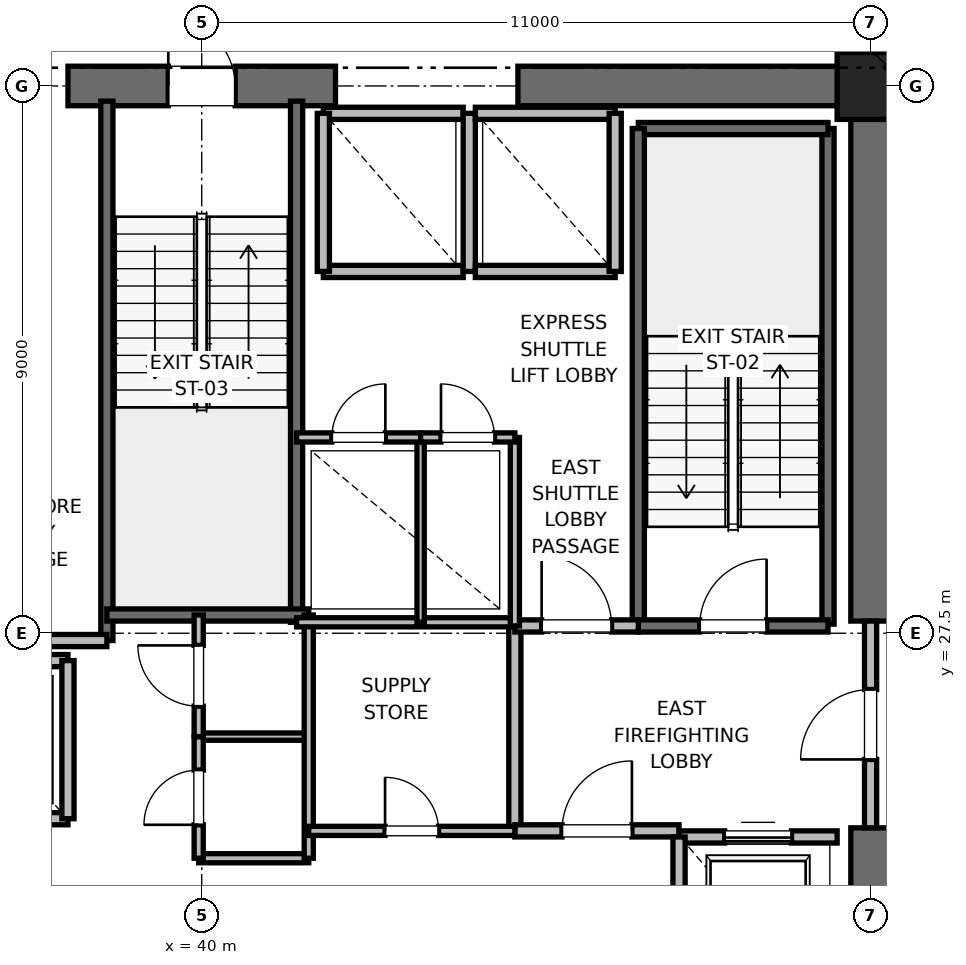
"""IFC4 building model, lengths in metres.
Left out: names, types, materials, properties, quantities, classifications, styles, units other than length and angle.
Written with IfcOpenShell. Run it as: python <this file> out.ifc"""

import sys

from ifc_helpers import new_model, si_unit, direction, frame, frame_2d, origin, origin_2d, place, context, subcontext, project, spatial, rectangle, extrude, element, fill, save


model = new_model("IFC4")
c1 = context("Model", 3, precision=1e-05, world=origin(), true_north=direction((0.0, 1.0)))
c2 = subcontext(c1, "Body", "Model", "MODEL_VIEW")
j1 = project(units=[si_unit("LENGTHUNIT", "METRE"), si_unit("PLANEANGLEUNIT", "RADIAN")], contexts=[c1])
p1 = place(None, origin())
s1 = spatial("IfcSite", under=j1, at=p1, CompositionType="ELEMENT")
p2 = place(p1, origin())
s2 = spatial("IfcBuilding", under=s1, at=p2, CompositionType="ELEMENT")
p3 = place(p2, frame((0.0, 0.0, 87.6)))
s3 = spatial("IfcBuildingStorey", under=s2, at=p3, CompositionType="ELEMENT", Elevation=87.6)
p4 = place(p3, frame((51.0, 36.5, 0.0), z_axis=(0.0, 0.0, 1.0), x_axis=(1.0, 0.0, 0.0)))
e1 = element("IfcColumn", 1, at=p4, inside=s3, PredefinedType="PILASTER", context=c2, shape_type="SweptSolid", body=[
    extrude(rectangle(XDim=1.1, YDim=1.1, at=origin_2d()), origin(), (0.0, 0.0, 1.0), 4.0),
])
p5 = place(p3, frame((37.8, 36.5, 0.0), z_axis=(0.0, 0.0, 1.0), x_axis=(1.0, 0.0, 0.0)))
e2 = element("IfcWall", 2, at=p5, inside=s3, PredefinedType="SHEAR", context=c2, shape_type="SweptSolid", body=[
    extrude(rectangle(XDim=4.4, YDim=0.65, at=frame_2d((2.2, 0.0))), origin(), (0.0, 0.0, 1.0), 3.76),
])
p6 = place(p5, frame((1.65, 0.0, 0.0)))
e3 = element("IfcOpeningElement", 3, at=p6, cuts=e2, PredefinedType="OPENING", context=c2, shape_type="SweptSolid", body=[
    extrude(rectangle(XDim=1.1, YDim=2.15, at=frame_2d((0.55, 1.075))), frame((0.0, 0.325, 0.0), z_axis=(0.0, -1.0, 0.0), x_axis=(1.0, 0.0, 0.0)), (0.0, 0.0, 1.0), 0.65),
])
for number, where, z_axis, x_axis in (
    (4, (45.2, 36.5, 0.0), (0.0, 0.0, 1.0), (1.0, 0.0, 0.0)),
    (5, (51.0, 18.5, 0.0), (0.0, 0.0, 1.0), (0.0, 1.0, 0.0)),
):
    element("IfcWall", number, at=place(p3, frame(where, z_axis=z_axis, x_axis=x_axis)), inside=s3, PredefinedType="SHEAR", context=c2, shape_type="SweptSolid", body=[
        extrude(rectangle(XDim=5.8, YDim=0.65, at=frame_2d((2.9, 0.0))), origin(), (0.0, 0.0, 1.0), 3.76),
    ])
p7 = place(p3, frame((51.0, 27.7, 0.0), z_axis=(0.0, 0.0, 1.0), x_axis=(0.0, 1.0, 0.0)))
e6 = element("IfcWall", 6, at=p7, inside=s3, PredefinedType="SHEAR", context=c2, shape_type="SweptSolid", body=[
    extrude(rectangle(XDim=8.8, YDim=0.65, at=frame_2d((4.4, 0.0))), origin(), (0.0, 0.0, 1.0), 3.76),
])
p8 = place(p3, frame((50.3, 27.65, 0.0), z_axis=(0.0, 0.0, 1.0), x_axis=(0.0, 1.0, 0.0)))
e7 = element("IfcWall", 7, at=p8, inside=s3, PredefinedType="SOLIDWALL", context=c2, shape_type="SweptSolid", body=[
    extrude(rectangle(XDim=8.15, YDim=0.2, at=frame_2d((4.075, 0.0))), origin(), (0.0, 0.0, 1.0), 3.76),
])
p9 = place(p3, frame((47.18, 35.8, 0.0), z_axis=(0.0, 0.0, 1.0), x_axis=(1.0, 0.0, 0.0)))
e8 = element("IfcWall", 8, at=p9, inside=s3, PredefinedType="SOLIDWALL", context=c2, shape_type="SweptSolid", body=[
    extrude(rectangle(XDim=3.12, YDim=0.2, at=frame_2d((1.56, 0.0))), origin(), (0.0, 0.0, 1.0), 3.76),
])
p10 = place(p3, frame((47.18, 27.62, 0.0), z_axis=(0.0, 0.0, 1.0), x_axis=(0.0, 1.0, 0.0)))
e9 = element("IfcWall", 9, at=p10, inside=s3, PredefinedType="SOLIDWALL", context=c2, shape_type="SweptSolid", body=[
    extrude(rectangle(XDim=8.18, YDim=0.2, at=frame_2d((4.09, 0.0))), origin(), (0.0, 0.0, 1.0), 3.76),
])
p11 = place(p3, frame((47.18, 27.62, 0.0), z_axis=(0.0, 0.0, 1.0), x_axis=(1.0, 0.0, 0.0)))
e10 = element("IfcWall", 10, at=p11, inside=s3, PredefinedType="SOLIDWALL", context=c2, shape_type="SweptSolid", body=[
    extrude(rectangle(XDim=3.12, YDim=0.2, at=frame_2d((1.56, 0.0))), origin(), (0.0, 0.0, 1.0), 3.76),
])
p12 = place(p11, frame((1.01, 0.0, 0.0)))
e11 = element("IfcOpeningElement", 11, at=p12, cuts=e10, PredefinedType="OPENING", context=c2, shape_type="SweptSolid", body=[
    extrude(rectangle(XDim=1.1, YDim=2.15, at=frame_2d((0.55, 1.075))), frame((0.0, 0.1, 0.0), z_axis=(0.0, -1.0, 0.0), x_axis=(1.0, 0.0, 0.0)), (0.0, 0.0, 1.0), 0.2),
])
p13 = place(p3, frame((38.44, 27.38, 0.0), z_axis=(0.0, 0.0, 1.0), x_axis=(0.0, 1.0, 0.0)))
e12 = element("IfcWall", 12, at=p13, inside=s3, PredefinedType="SOLIDWALL", context=c2, shape_type="SweptSolid", body=[
    extrude(rectangle(XDim=8.87, YDim=0.2, at=frame_2d((4.435, 0.0))), origin(), (0.0, 0.0, 1.0), 3.76),
])
p14 = place(p3, frame((41.56, 27.68, 0.0), z_axis=(0.0, 0.0, 1.0), x_axis=(0.0, 1.0, 0.0)))
e13 = element("IfcWall", 13, at=p14, inside=s3, PredefinedType="SOLIDWALL", context=c2, shape_type="SweptSolid", body=[
    extrude(rectangle(XDim=8.57, YDim=0.2, at=frame_2d((4.285, 0.0))), origin(), (0.0, 0.0, 1.0), 3.76),
])
p15 = place(p3, frame((38.44, 27.8, 0.0), z_axis=(0.0, 0.0, 1.0), x_axis=(1.0, 0.0, 0.0)))
e14 = element("IfcWall", 14, at=p15, inside=s3, PredefinedType="SOLIDWALL", context=c2, shape_type="SweptSolid", body=[
    extrude(rectangle(XDim=3.32, YDim=0.2, at=frame_2d((1.66, 0.0))), origin(), (0.0, 0.0, 1.0), 3.76),
])
p16 = place(p3, frame((32.82, 27.38, 0.0), z_axis=(0.0, 0.0, 1.0), x_axis=(1.0, 0.0, 0.0)))
e15 = element("IfcWall", 15, at=p16, inside=s3, PredefinedType="PARTITIONING", context=c2, shape_type="SweptSolid", body=[
    extrude(rectangle(XDim=5.62, YDim=0.2, at=frame_2d((2.81, 0.0))), origin(), (0.0, 0.0, 1.0), 3.76),
])
p17 = place(p3, frame((45.15, 24.25, 0.0), z_axis=(0.0, 0.0, 1.0), x_axis=(0.0, 1.0, 0.0)))
e16 = element("IfcWall", 16, at=p17, inside=s3, PredefinedType="PARTITIONING", context=c2, shape_type="SweptSolid", body=[
    extrude(rectangle(XDim=3.37, YDim=0.2, at=frame_2d((1.685, 0.0))), origin(), (0.0, 0.0, 1.0), 3.76),
])
p18 = place(p3, frame((45.15, 24.25, 0.0), z_axis=(0.0, 0.0, 1.0), x_axis=(1.0, 0.0, 0.0)))
e17 = element("IfcWall", 17, at=p18, inside=s3, PredefinedType="PARTITIONING", context=c2, shape_type="SweptSolid", body=[
    extrude(rectangle(XDim=2.7, YDim=0.2, at=frame_2d((1.35, 0.0))), origin(), (0.0, 0.0, 1.0), 3.76),
])
p19 = place(p18, frame((0.775, 0.0, 0.0)))
e18 = element("IfcOpeningElement", 18, at=p19, cuts=e17, PredefinedType="OPENING", context=c2, shape_type="SweptSolid", body=[
    extrude(rectangle(XDim=1.15, YDim=2.2, at=frame_2d((0.575, 1.1))), frame((0.0, 0.1, 0.0), z_axis=(0.0, -1.0, 0.0), x_axis=(1.0, 0.0, 0.0)), (0.0, 0.0, 1.0), 0.2),
])
p20 = place(p3, frame((45.15, 27.62, 0.0), z_axis=(0.0, 0.0, 1.0), x_axis=(1.0, 0.0, 0.0)))
e19 = element("IfcWall", 19, at=p20, inside=s3, PredefinedType="PARTITIONING", context=c2, shape_type="SweptSolid", body=[
    extrude(rectangle(XDim=2.03, YDim=0.2, at=frame_2d((1.015, 0.0))), origin(), (0.0, 0.0, 1.0), 3.76),
])
p21 = place(p20, frame((0.44, 0.0, 0.0)))
e20 = element("IfcOpeningElement", 20, at=p21, cuts=e19, PredefinedType="OPENING", context=c2, shape_type="SweptSolid", body=[
    extrude(rectangle(XDim=1.15, YDim=2.2, at=frame_2d((0.575, 1.1))), frame((0.0, 0.1, 0.0), z_axis=(0.0, -1.0, 0.0), x_axis=(1.0, 0.0, 0.0)), (0.0, 0.0, 1.0), 0.2),
])
p22 = place(p3, frame((51.0, 24.3, 0.0), z_axis=(0.0, 0.0, 1.0), x_axis=(0.0, 1.0, 0.0)))
e21 = element("IfcWall", 21, at=p22, inside=s3, PredefinedType="PARTITIONING", context=c2, shape_type="SweptSolid", body=[
    extrude(rectangle(XDim=3.4, YDim=0.2, at=frame_2d((1.7, 0.0))), origin(), (0.0, 0.0, 1.0), 2.54),
])
p23 = place(p22, frame((1.125, 0.0, 0.0)))
e22 = element("IfcOpeningElement", 22, at=p23, cuts=e21, PredefinedType="OPENING", context=c2, shape_type="SweptSolid", body=[
    extrude(rectangle(XDim=1.15, YDim=2.2, at=frame_2d((0.575, 1.1))), frame((0.0, 0.1, 0.0), z_axis=(0.0, -1.0, 0.0), x_axis=(1.0, 0.0, 0.0)), (0.0, 0.0, 1.0), 0.2),
])
p24 = place(p3, frame((50.45, 24.15, 0.0), z_axis=(0.0, 0.0, 1.0), x_axis=(-1.0, 0.0, 0.0)))
e23 = element("IfcWall", 23, at=p24, inside=s3, PredefinedType="SOLIDWALL", context=c2, shape_type="SweptSolid", body=[
    extrude(rectangle(XDim=2.6, YDim=0.2, at=frame_2d((1.3, 0.0))), origin(), (0.0, 0.0, 1.0), 2.54),
])
p25 = place(p24, frame((0.75, 0.0, 0.0)))
e24 = element("IfcOpeningElement", 24, at=p25, cuts=e23, PredefinedType="OPENING", context=c2, shape_type="SweptSolid", body=[
    extrude(rectangle(XDim=1.1, YDim=2.2, at=frame_2d((0.55, 1.1))), frame((0.0, 0.1, 0.0), z_axis=(0.0, -1.0, 0.0), x_axis=(1.0, 0.0, 0.0)), (0.0, 0.0, 1.0), 0.2),
])
p26 = place(p3, frame((47.85, 24.15, 0.0), z_axis=(0.0, 0.0, 1.0), x_axis=(0.0, -1.0, 0.0)))
e25 = element("IfcWall", 25, at=p26, inside=s3, PredefinedType="SOLIDWALL", context=c2, shape_type="SweptSolid", body=[
    extrude(rectangle(XDim=3.0, YDim=0.2, at=frame_2d((1.5, 0.0))), origin(), (0.0, 0.0, 1.0), 3.76),
])
p27 = place(p3, frame((35.5, 24.45, 0.0), z_axis=(0.0, 0.0, 1.0), x_axis=(1.0, 0.0, 0.0)))
e26 = element("IfcWall", 26, at=p27, inside=s3, PredefinedType="SOLIDWALL", context=c2, shape_type="SweptSolid", body=[
    extrude(rectangle(XDim=2.3, YDim=0.2, at=frame_2d((1.15, 0.0))), origin(), (0.0, 0.0, 1.0), 3.76),
])
p28 = place(p27, frame((0.6, 0.0, 0.0)))
e27 = element("IfcOpeningElement", 27, at=p28, cuts=e26, PredefinedType="OPENING", context=c2, shape_type="SweptSolid", body=[
    extrude(rectangle(XDim=1.1, YDim=2.2, at=frame_2d((0.55, 1.1))), frame((0.0, 0.1, 0.0), z_axis=(0.0, -1.0, 0.0), x_axis=(1.0, 0.0, 0.0)), (0.0, 0.0, 1.0), 0.2),
])
p29 = place(p3, frame((37.8, 27.05, 0.0), z_axis=(0.0, 0.0, 1.0), x_axis=(-1.0, 0.0, 0.0)))
e28 = element("IfcWall", 28, at=p29, inside=s3, PredefinedType="SOLIDWALL", context=c2, shape_type="SweptSolid", body=[
    extrude(rectangle(XDim=2.3, YDim=0.2, at=frame_2d((1.15, 0.0))), origin(), (0.0, 0.0, 1.0), 3.76),
])
p30 = place(p3, frame((37.8, 24.45, 0.0), z_axis=(0.0, 0.0, 1.0), x_axis=(0.0, 1.0, 0.0)))
e29 = element("IfcWall", 29, at=p30, inside=s3, PredefinedType="SOLIDWALL", context=c2, shape_type="SweptSolid", body=[
    extrude(rectangle(XDim=2.6, YDim=0.2, at=frame_2d((1.3, 0.0))), origin(), (0.0, 0.0, 1.0), 3.76),
])
p31 = place(p3, frame((42.0, 33.45, 0.0), z_axis=(0.0, 0.0, 1.0), x_axis=(1.0, 0.0, 0.0)))
e30 = element("IfcWall", 30, at=p31, inside=s3, PredefinedType="SOLIDWALL", context=c2, shape_type="SweptSolid", body=[
    extrude(rectangle(XDim=2.3, YDim=0.2, at=frame_2d((1.15, 0.0))), origin(), (0.0, 0.0, 1.0), 3.76),
])
p32 = place(p3, frame((44.3, 36.05, 0.0), z_axis=(0.0, 0.0, 1.0), x_axis=(-1.0, 0.0, 0.0)))
e31 = element("IfcWall", 31, at=p32, inside=s3, PredefinedType="SOLIDWALL", context=c2, shape_type="SweptSolid", body=[
    extrude(rectangle(XDim=2.3, YDim=0.2, at=frame_2d((1.15, 0.0))), origin(), (0.0, 0.0, 1.0), 2.54),
])
for number, where, z_axis, x_axis in (
    (32, (42.0, 36.05, 0.0), (0.0, 0.0, 1.0), (0.0, -1.0, 0.0)),
    (33, (44.4, 33.45, 0.0), (0.0, 0.0, 1.0), (0.0, 1.0, 0.0)),
):
    element("IfcWall", number, at=place(p3, frame(where, z_axis=z_axis, x_axis=x_axis)), inside=s3, PredefinedType="SOLIDWALL", context=c2, shape_type="SweptSolid", body=[
        extrude(rectangle(XDim=2.6, YDim=0.2, at=frame_2d((1.3, 0.0))), origin(), (0.0, 0.0, 1.0), 2.54),
    ])
p33 = place(p3, frame((44.5, 33.45, 0.0), z_axis=(0.0, 0.0, 1.0), x_axis=(1.0, 0.0, 0.0)))
e34 = element("IfcWall", 34, at=p33, inside=s3, PredefinedType="SOLIDWALL", context=c2, shape_type="SweptSolid", body=[
    extrude(rectangle(XDim=2.3, YDim=0.2, at=frame_2d((1.15, 0.0))), origin(), (0.0, 0.0, 1.0), 3.76),
])
p34 = place(p3, frame((46.8, 36.05, 0.0), z_axis=(0.0, 0.0, 1.0), x_axis=(-1.0, 0.0, 0.0)))
e35 = element("IfcWall", 35, at=p34, inside=s3, PredefinedType="SOLIDWALL", context=c2, shape_type="SweptSolid", body=[
    extrude(rectangle(XDim=2.3, YDim=0.2, at=frame_2d((1.15, 0.0))), origin(), (0.0, 0.0, 1.0), 2.54),
])
p35 = place(p3, frame((46.8, 33.45, 0.0), z_axis=(0.0, 0.0, 1.0), x_axis=(0.0, 1.0, 0.0)))
e36 = element("IfcWall", 36, at=p35, inside=s3, PredefinedType="SOLIDWALL", context=c2, shape_type="SweptSolid", body=[
    extrude(rectangle(XDim=2.6, YDim=0.2, at=frame_2d((1.3, 0.0))), origin(), (0.0, 0.0, 1.0), 3.76),
])
p36 = place(p3, frame((39.95, 23.8, 0.0), z_axis=(0.0, 0.0, 1.0), x_axis=(1.0, 0.0, 0.0)))
e37 = element("IfcWall", 37, at=p36, inside=s3, PredefinedType="PARTITIONING", context=c2, shape_type="SweptSolid", body=[
    extrude(rectangle(XDim=1.81, YDim=0.15, at=frame_2d((0.905, 0.0))), origin(), (0.0, 0.0, 1.0), 2.85),
])
p37 = place(p3, frame((39.95, 25.8, 0.0), z_axis=(0.0, 0.0, 1.0), x_axis=(1.0, 0.0, 0.0)))
e38 = element("IfcWall", 38, at=p37, inside=s3, PredefinedType="PARTITIONING", context=c2, shape_type="SweptSolid", body=[
    extrude(rectangle(XDim=1.81, YDim=0.12, at=frame_2d((0.905, 0.0))), origin(), (0.0, 0.0, 1.0), 2.85),
])
p38 = place(p3, frame((41.76, 23.8, 0.0), z_axis=(0.0, 0.0, 1.0), x_axis=(0.0, 1.0, 0.0)))
e39 = element("IfcWall", 39, at=p38, inside=s3, PredefinedType="PARTITIONING", context=c2, shape_type="SweptSolid", body=[
    extrude(rectangle(XDim=4.0, YDim=0.15, at=frame_2d((2.0, 0.0))), origin(), (0.0, 0.0, 1.0), 2.85),
])
p39 = place(p3, frame((39.95, 23.8, 0.0), z_axis=(0.0, 0.0, 1.0), x_axis=(0.0, 1.0, 0.0)))
e40 = element("IfcWall", 40, at=p39, inside=s3, PredefinedType="PARTITIONING", context=c2, shape_type="SweptSolid", body=[
    extrude(rectangle(XDim=2.0, YDim=0.15, at=frame_2d((1.0, 0.0))), origin(), (0.0, 0.0, 1.0), 2.85),
])
p40 = place(p39, frame((0.55, 0.0, 0.0)))
e41 = element("IfcOpeningElement", 41, at=p40, cuts=e40, PredefinedType="OPENING", context=c2, shape_type="SweptSolid", body=[
    extrude(rectangle(XDim=0.9, YDim=2.1, at=frame_2d((0.45, 1.05))), frame((0.0, 0.075, 0.0), z_axis=(0.0, -1.0, 0.0), x_axis=(1.0, 0.0, 0.0)), (0.0, 0.0, 1.0), 0.15),
])
p41 = place(p3, frame((39.95, 25.8, 0.0), z_axis=(0.0, 0.0, 1.0), x_axis=(0.0, 1.0, 0.0)))
e42 = element("IfcWall", 42, at=p41, inside=s3, PredefinedType="PARTITIONING", context=c2, shape_type="SweptSolid", body=[
    extrude(rectangle(XDim=2.0, YDim=0.15, at=frame_2d((1.0, 0.0))), origin(), (0.0, 0.0, 1.0), 2.85),
])
p42 = place(p41, frame((0.5, 0.0, 0.0)))
e43 = element("IfcOpeningElement", 43, at=p42, cuts=e42, PredefinedType="OPENING", context=c2, shape_type="SweptSolid", body=[
    extrude(rectangle(XDim=1.0, YDim=2.15, at=frame_2d((0.5, 1.075))), frame((0.0, 0.075, 0.0), z_axis=(0.0, -1.0, 0.0), x_axis=(1.0, 0.0, 0.0)), (0.0, 0.0, 1.0), 0.15),
])
p43 = place(p3, frame((41.56, 27.68, 0.0), z_axis=(0.0, 0.0, 1.0), x_axis=(1.0, 0.0, 0.0)))
e44 = element("IfcWall", 44, at=p43, inside=s3, PredefinedType="PARTITIONING", context=c2, shape_type="SweptSolid", body=[
    extrude(rectangle(XDim=3.59, YDim=0.15, at=frame_2d((1.795, 0.0))), origin(), (0.0, 0.0, 1.0), 2.85),
])
p44 = place(p3, frame((41.76, 24.25, 0.0), z_axis=(0.0, 0.0, 1.0), x_axis=(1.0, 0.0, 0.0)))
e45 = element("IfcWall", 45, at=p44, inside=s3, PredefinedType="PARTITIONING", context=c2, shape_type="SweptSolid", body=[
    extrude(rectangle(XDim=3.39, YDim=0.15, at=frame_2d((1.695, 0.0))), origin(), (0.0, 0.0, 1.0), 2.85),
])
p45 = place(p44, frame((1.255, 0.0, 0.0)))
e46 = element("IfcOpeningElement", 46, at=p45, cuts=e45, PredefinedType="OPENING", context=c2, shape_type="SweptSolid", body=[
    extrude(rectangle(XDim=0.88, YDim=2.1, at=frame_2d((0.44, 1.05))), frame((0.0, 0.075, 0.0), z_axis=(0.0, -1.0, 0.0), x_axis=(1.0, 0.0, 0.0)), (0.0, 0.0, 1.0), 0.15),
])
p46 = place(p3, frame((45.15, 27.62, 0.0), z_axis=(0.0, 0.0, 1.0), x_axis=(0.0, 1.0, 0.0)))
e47 = element("IfcWall", 47, at=p46, inside=s3, PredefinedType="PARTITIONING", context=c2, shape_type="SweptSolid", body=[
    extrude(rectangle(XDim=3.1, YDim=0.15, at=frame_2d((1.55, 0.0))), origin(), (0.0, 0.0, 1.0), 2.85),
])
p47 = place(p3, frame((43.6, 27.68, 0.0), z_axis=(0.0, 0.0, 1.0), x_axis=(0.0, 1.0, 0.0)))
e48 = element("IfcWall", 48, at=p47, inside=s3, PredefinedType="PARTITIONING", context=c2, shape_type="SweptSolid", body=[
    extrude(rectangle(XDim=3.04, YDim=0.12, at=frame_2d((1.52, 0.0))), origin(), (0.0, 0.0, 1.0), 2.85),
])
p48 = place(p3, frame((41.56, 30.72, 0.0), z_axis=(0.0, 0.0, 1.0), x_axis=(1.0, 0.0, 0.0)))
e49 = element("IfcWall", 49, at=p48, inside=s3, PredefinedType="PARTITIONING", context=c2, shape_type="SweptSolid", body=[
    extrude(rectangle(XDim=2.04, YDim=0.15, at=frame_2d((1.02, 0.0))), origin(), (0.0, 0.0, 1.0), 2.85),
])
p49 = place(p48, frame((0.58, 0.0, 0.0)))
e50 = element("IfcOpeningElement", 50, at=p49, cuts=e49, PredefinedType="OPENING", context=c2, shape_type="SweptSolid", body=[
    extrude(rectangle(XDim=0.88, YDim=2.1, at=frame_2d((0.44, 1.05))), frame((0.0, 0.075, 0.0), z_axis=(0.0, -1.0, 0.0), x_axis=(1.0, 0.0, 0.0)), (0.0, 0.0, 1.0), 0.15),
])
p50 = place(p3, frame((43.6, 30.72, 0.0), z_axis=(0.0, 0.0, 1.0), x_axis=(1.0, 0.0, 0.0)))
e51 = element("IfcWall", 51, at=p50, inside=s3, PredefinedType="PARTITIONING", context=c2, shape_type="SweptSolid", body=[
    extrude(rectangle(XDim=1.55, YDim=0.15, at=frame_2d((0.775, 0.0))), origin(), (0.0, 0.0, 1.0), 2.85),
])
p51 = place(p50, frame((0.335, 0.0, 0.0)))
e52 = element("IfcOpeningElement", 52, at=p51, cuts=e51, PredefinedType="OPENING", context=c2, shape_type="SweptSolid", body=[
    extrude(rectangle(XDim=0.88, YDim=2.1, at=frame_2d((0.44, 1.05))), frame((0.0, 0.075, 0.0), z_axis=(0.0, -1.0, 0.0), x_axis=(1.0, 0.0, 0.0)), (0.0, 0.0, 1.0), 0.15),
])
p52 = place(p12, origin())
e53 = element("IfcDoor", 53, at=p52, inside=s3, OperationType="SINGLE_SWING_RIGHT", PredefinedType="DOOR", context=c2, shape_type="SweptSolid", body=[
    extrude(rectangle(XDim=1.1, YDim=2.15, at=frame_2d((0.55, 1.075))), frame((0.0, 0.025, 0.0), z_axis=(0.0, -1.0, 0.0), x_axis=(1.0, 0.0, 0.0)), (0.0, 0.0, 1.0), 0.05),
])
fill(e11, e53)
p53 = place(p6, origin())
e54 = element("IfcDoor", 54, at=p53, inside=s3, OperationType="SINGLE_SWING_LEFT", PredefinedType="DOOR", context=c2, shape_type="SweptSolid", body=[
    extrude(rectangle(XDim=1.1, YDim=2.15, at=frame_2d((0.55, 1.075))), frame((0.0, 0.025, 0.0), z_axis=(0.0, -1.0, 0.0), x_axis=(1.0, 0.0, 0.0)), (0.0, 0.0, 1.0), 0.05),
])
fill(e3, e54)
p54 = place(p19, origin())
e55 = element("IfcDoor", 55, at=p54, inside=s3, OperationType="SINGLE_SWING_RIGHT", PredefinedType="DOOR", context=c2, shape_type="SweptSolid", body=[
    extrude(rectangle(XDim=1.15, YDim=2.2, at=frame_2d((0.575, 1.1))), frame((0.0, 0.025, 0.0), z_axis=(0.0, -1.0, 0.0), x_axis=(1.0, 0.0, 0.0)), (0.0, 0.0, 1.0), 0.05),
])
fill(e18, e55)
p55 = place(p21, origin())
e56 = element("IfcDoor", 56, at=p55, inside=s3, OperationType="SINGLE_SWING_LEFT", PredefinedType="DOOR", context=c2, shape_type="SweptSolid", body=[
    extrude(rectangle(XDim=1.15, YDim=2.2, at=frame_2d((0.575, 1.1))), frame((0.0, 0.025, 0.0), z_axis=(0.0, -1.0, 0.0), x_axis=(1.0, 0.0, 0.0)), (0.0, 0.0, 1.0), 0.05),
])
fill(e20, e56)
p56 = place(p23, origin())
e57 = element("IfcDoor", 57, at=p56, inside=s3, OperationType="SINGLE_SWING_LEFT", PredefinedType="DOOR", context=c2, shape_type="SweptSolid", body=[
    extrude(rectangle(XDim=1.15, YDim=2.2, at=frame_2d((0.575, 1.1))), frame((0.0, 0.025, 0.0), z_axis=(0.0, -1.0, 0.0), x_axis=(1.0, 0.0, 0.0)), (0.0, 0.0, 1.0), 0.05),
])
fill(e22, e57)
p57 = place(p25, origin())
e58 = element("IfcDoor", 58, at=p57, inside=s3, OperationType="SLIDING_TO_RIGHT", PredefinedType="DOOR", context=c2, shape_type="SweptSolid", body=[
    extrude(rectangle(XDim=1.1, YDim=2.2, at=frame_2d((0.55, 1.1))), frame((0.0, 0.025, 0.0), z_axis=(0.0, -1.0, 0.0), x_axis=(1.0, 0.0, 0.0)), (0.0, 0.0, 1.0), 0.05),
])
fill(e24, e58)
p58 = place(p40, origin())
e59 = element("IfcDoor", 59, at=p58, inside=s3, OperationType="SINGLE_SWING_LEFT", PredefinedType="DOOR", context=c2, shape_type="SweptSolid", body=[
    extrude(rectangle(XDim=0.9, YDim=2.1, at=frame_2d((0.45, 1.05))), frame((0.0, 0.025, 0.0), z_axis=(0.0, -1.0, 0.0), x_axis=(1.0, 0.0, 0.0)), (0.0, 0.0, 1.0), 0.05),
])
fill(e41, e59)
p59 = place(p42, origin())
e60 = element("IfcDoor", 60, at=p59, inside=s3, OperationType="SINGLE_SWING_RIGHT", PredefinedType="DOOR", context=c2, shape_type="SweptSolid", body=[
    extrude(rectangle(XDim=1.0, YDim=2.15, at=frame_2d((0.5, 1.075))), frame((0.0, 0.025, 0.0), z_axis=(0.0, -1.0, 0.0), x_axis=(1.0, 0.0, 0.0)), (0.0, 0.0, 1.0), 0.05),
])
fill(e43, e60)
p60 = place(p45, origin())
e61 = element("IfcDoor", 61, at=p60, inside=s3, OperationType="SINGLE_SWING_LEFT", PredefinedType="DOOR", context=c2, shape_type="SweptSolid", body=[
    extrude(rectangle(XDim=0.88, YDim=2.1, at=frame_2d((0.44, 1.05))), frame((0.0, 0.025, 0.0), z_axis=(0.0, -1.0, 0.0), x_axis=(1.0, 0.0, 0.0)), (0.0, 0.0, 1.0), 0.05),
])
fill(e46, e61)
p61 = place(p49, origin())
e62 = element("IfcDoor", 62, at=p61, inside=s3, OperationType="SINGLE_SWING_RIGHT", PredefinedType="DOOR", context=c2, shape_type="SweptSolid", body=[
    extrude(rectangle(XDim=0.88, YDim=2.1, at=frame_2d((0.44, 1.05))), frame((0.0, 0.025, 0.0), z_axis=(0.0, -1.0, 0.0), x_axis=(1.0, 0.0, 0.0)), (0.0, 0.0, 1.0), 0.05),
])
fill(e50, e62)
p62 = place(p51, origin())
e63 = element("IfcDoor", 63, at=p62, inside=s3, OperationType="SINGLE_SWING_LEFT", PredefinedType="DOOR", context=c2, shape_type="SweptSolid", body=[
    extrude(rectangle(XDim=0.88, YDim=2.1, at=frame_2d((0.44, 1.05))), frame((0.0, 0.025, 0.0), z_axis=(0.0, -1.0, 0.0), x_axis=(1.0, 0.0, 0.0)), (0.0, 0.0, 1.0), 0.05),
])
fill(e52, e63)
save(model, sys.argv[1])
